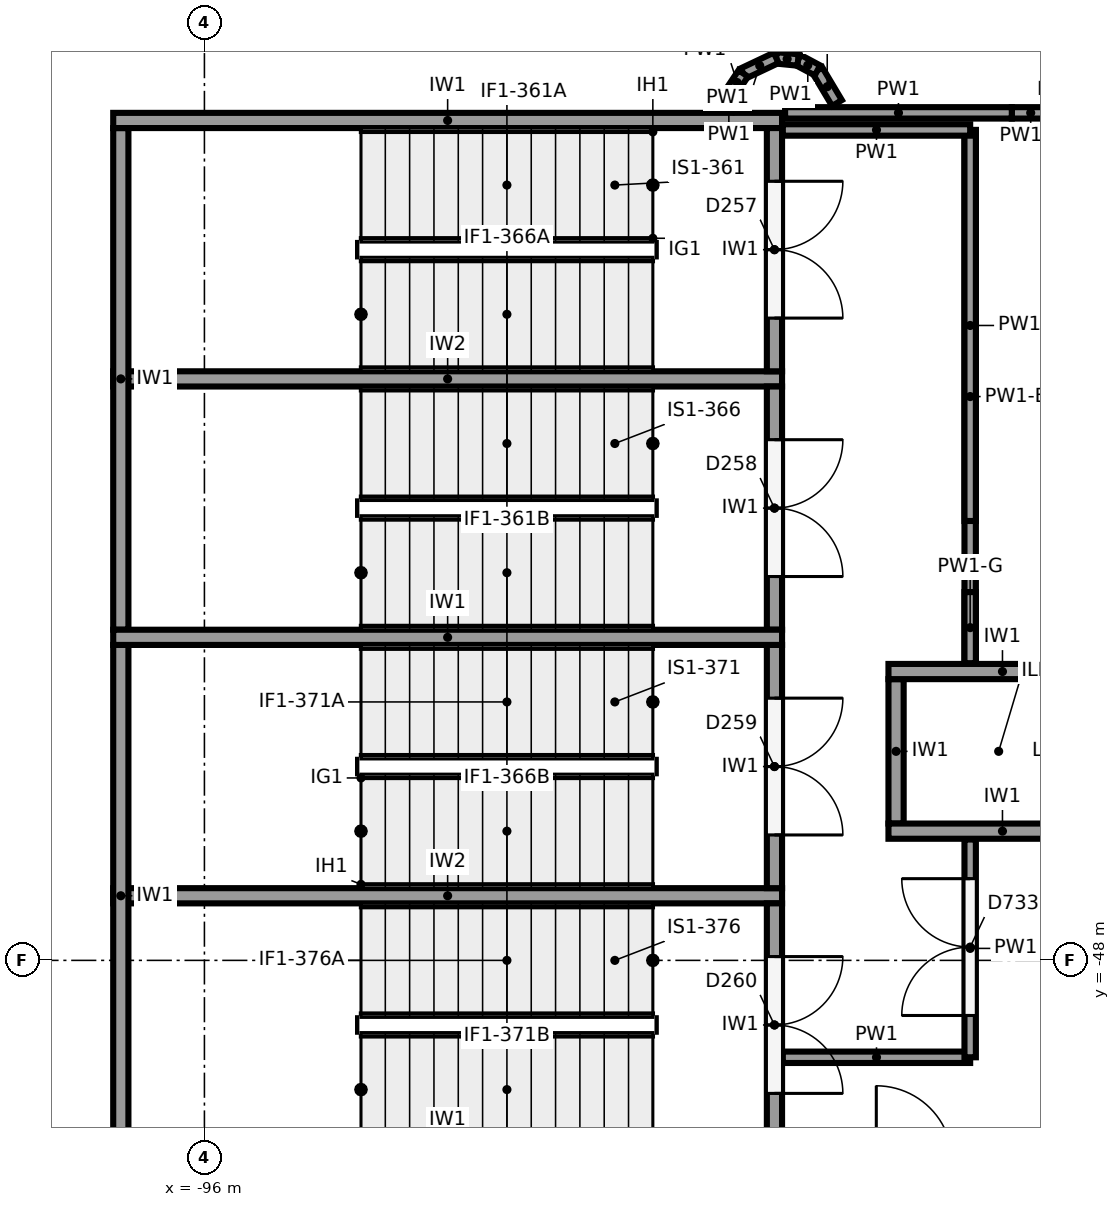
"""IFC4 building model, lengths in metres.
Left out: names, types, materials, properties, quantities, classifications, styles, units other than length and angle.
Written with IfcOpenShell. Run it as: python <this file> out.ifc"""

import sys

from ifc_helpers import new_model, si_unit, direction, frame, frame_2d, origin, origin_2d, place, context, subcontext, project, spatial, rectangle, circle, extrude, element, fill, save


model = new_model("IFC4")
c1 = context("Model", 3, precision=1e-05, world=origin(), true_north=direction((0.0, 1.0)))
c2 = subcontext(c1, "Body", "Model", "MODEL_VIEW")
j1 = project(units=[si_unit("LENGTHUNIT", "METRE"), si_unit("PLANEANGLEUNIT", "RADIAN")], contexts=[c1])
p1 = place(None, origin())
s1 = spatial("IfcSite", under=j1, at=p1, CompositionType="ELEMENT")
p2 = place(p1, origin())
s2 = spatial("IfcBuilding", under=s1, at=p2, CompositionType="ELEMENT")
p3 = place(p2, frame((0.0, 0.0, -4.0)))
s3 = spatial("IfcBuildingStorey", under=s2, at=p3, CompositionType="ELEMENT", Elevation=-4.0)
p4 = place(p3, frame((-84.884, -42.562, -1.2), z_axis=(0.0, 0.0, 1.0), x_axis=(1.0, 0.0, 0.0)))
e1 = element("IfcColumn", 1, at=p4, inside=s3, PredefinedType="COLUMN", context=c2, shape_type="SweptSolid", body=[
    extrude(circle(Radius=0.6, at=origin_2d()), origin(), (0.0, 0.0, 1.0), 5.2),
])
for number, where, z_axis, x_axis in (
    (2, (-97.2, -36.95, -1.2), (0.0, 0.0, 1.0), (1.0, 0.0, 0.0)),
    (3, (-97.2, -43.75, -1.2), (0.0, 0.0, 1.0), (1.0, 0.0, 0.0)),
):
    element("IfcWall", number, at=place(p3, frame(where, z_axis=z_axis, x_axis=x_axis)), inside=s3, PredefinedType="SHEAR", context=c2, shape_type="SweptSolid", body=[
        extrude(rectangle(XDim=8.8, YDim=0.2, at=frame_2d((4.4, 0.0))), origin(), (0.0, 0.0, 1.0), 4.8),
    ])
for number, where, z_axis, x_axis in (
    (4, (-97.1, -37.05, -1.2), (0.0, 0.0, 1.0), (0.0, -1.0, 0.0)),
    (5, (-97.1, -43.85, -1.2), (0.0, 0.0, 1.0), (0.0, -1.0, 0.0)),
):
    element("IfcWall", number, at=place(p3, frame(where, z_axis=z_axis, x_axis=x_axis)), inside=s3, PredefinedType="SHEAR", context=c2, shape_type="SweptSolid", body=[
        extrude(rectangle(XDim=6.6, YDim=0.2, at=frame_2d((3.3, 0.0))), origin(), (0.0, 0.0, 1.0), 4.8),
    ])
for number, where, z_axis, x_axis in (
    (6, (-97.2, -40.35, -1.2), (0.0, 0.0, 1.0), (1.0, 0.0, 0.0)),
    (7, (-97.2, -47.15, -1.2), (0.0, 0.0, 1.0), (1.0, 0.0, 0.0)),
):
    element("IfcWall", number, at=place(p3, frame(where, z_axis=z_axis, x_axis=x_axis)), inside=s3, PredefinedType="SHEAR", context=c2, shape_type="SweptSolid", body=[
        extrude(rectangle(XDim=8.8, YDim=0.2, at=frame_2d((4.4, 0.0))), origin(), (0.0, 0.0, 1.0), 4.8),
    ])
p5 = place(p3, frame((-88.5, -37.05, -1.2), z_axis=(0.0, 0.0, 1.0), x_axis=(0.0, -1.0, 0.0)))
e8 = element("IfcWall", 8, at=p5, inside=s3, PredefinedType="SHEAR", context=c2, shape_type="SweptSolid", body=[
    extrude(rectangle(XDim=3.2, YDim=0.2, at=frame_2d((1.6, 0.0))), origin(), (0.0, 0.0, 1.0), 4.8),
])
p6 = place(p5, frame((0.7, 0.0, 1.2)))
e9 = element("IfcOpeningElement", 9, at=p6, cuts=e8, PredefinedType="OPENING", context=c2, shape_type="SweptSolid", body=[
    extrude(rectangle(XDim=1.8, YDim=2.1, at=frame_2d((0.9, 1.05))), frame((0.0, 0.11, 0.0), z_axis=(0.0, -1.0, 0.0), x_axis=(1.0, 0.0, 0.0)), (0.0, 0.0, 1.0), 0.22),
])
p7 = place(p3, frame((-88.5, -40.45, -1.2), z_axis=(0.0, 0.0, 1.0), x_axis=(0.0, -1.0, 0.0)))
e10 = element("IfcWall", 10, at=p7, inside=s3, PredefinedType="SHEAR", context=c2, shape_type="SweptSolid", body=[
    extrude(rectangle(XDim=3.2, YDim=0.2, at=frame_2d((1.6, 0.0))), origin(), (0.0, 0.0, 1.0), 4.8),
])
p8 = place(p7, frame((0.7, 0.0, 1.2)))
e11 = element("IfcOpeningElement", 11, at=p8, cuts=e10, PredefinedType="OPENING", context=c2, shape_type="SweptSolid", body=[
    extrude(rectangle(XDim=1.8, YDim=2.1, at=frame_2d((0.9, 1.05))), frame((0.0, 0.11, 0.0), z_axis=(0.0, -1.0, 0.0), x_axis=(1.0, 0.0, 0.0)), (0.0, 0.0, 1.0), 0.22),
])
p9 = place(p3, frame((-88.5, -43.85, -1.2), z_axis=(0.0, 0.0, 1.0), x_axis=(0.0, -1.0, 0.0)))
e12 = element("IfcWall", 12, at=p9, inside=s3, PredefinedType="SHEAR", context=c2, shape_type="SweptSolid", body=[
    extrude(rectangle(XDim=3.2, YDim=0.2, at=frame_2d((1.6, 0.0))), origin(), (0.0, 0.0, 1.0), 4.8),
])
p10 = place(p9, frame((0.7, 0.0, 1.2)))
e13 = element("IfcOpeningElement", 13, at=p10, cuts=e12, PredefinedType="OPENING", context=c2, shape_type="SweptSolid", body=[
    extrude(rectangle(XDim=1.8, YDim=2.1, at=frame_2d((0.9, 1.05))), frame((0.0, 0.11, 0.0), z_axis=(0.0, -1.0, 0.0), x_axis=(1.0, 0.0, 0.0)), (0.0, 0.0, 1.0), 0.22),
])
p11 = place(p3, frame((-88.5, -47.25, -1.2), z_axis=(0.0, 0.0, 1.0), x_axis=(0.0, -1.0, 0.0)))
e14 = element("IfcWall", 14, at=p11, inside=s3, PredefinedType="SHEAR", context=c2, shape_type="SweptSolid", body=[
    extrude(rectangle(XDim=3.2, YDim=0.2, at=frame_2d((1.6, 0.0))), origin(), (0.0, 0.0, 1.0), 4.8),
])
p12 = place(p11, frame((0.7, 0.0, 1.2)))
e15 = element("IfcOpeningElement", 15, at=p12, cuts=e14, PredefinedType="OPENING", context=c2, shape_type="SweptSolid", body=[
    extrude(rectangle(XDim=1.8, YDim=2.1, at=frame_2d((0.9, 1.05))), frame((0.0, 0.11, 0.0), z_axis=(0.0, -1.0, 0.0), x_axis=(1.0, 0.0, 0.0)), (0.0, 0.0, 1.0), 0.22),
])
for number, where, z_axis, x_axis in (
    (16, (-87.0, -44.2, -1.2), (0.0, 0.0, 1.0), (1.0, 0.0, 0.0)),
    (17, (-87.0, -46.3, -1.2), (0.0, 0.0, 1.0), (1.0, 0.0, 0.0)),
):
    element("IfcWall", number, at=place(p3, frame(where, z_axis=z_axis, x_axis=x_axis)), inside=s3, PredefinedType="SHEAR", context=c2, shape_type="SweptSolid", body=[
        extrude(rectangle(XDim=3.0, YDim=0.2, at=frame_2d((1.5, 0.0))), origin(), (0.0, 0.0, 1.0), 4.8),
    ])
p13 = place(p3, frame((-86.9, -44.3, -1.2), z_axis=(0.0, 0.0, 1.0), x_axis=(0.0, -1.0, 0.0)))
e18 = element("IfcWall", 18, at=p13, inside=s3, PredefinedType="SHEAR", context=c2, shape_type="SweptSolid", body=[
    extrude(rectangle(XDim=1.9, YDim=0.2, at=frame_2d((0.95, 0.0))), origin(), (0.0, 0.0, 1.0), 4.8),
])
p14 = place(p3, frame((-84.88, -36.85, 0.0), z_axis=(0.0, 0.0, 1.0), x_axis=(-1.0, 0.0, 0.0)))
e19 = element("IfcWall", 19, at=p14, inside=s3, PredefinedType="PARTITIONING", context=c2, shape_type="SweptSolid", body=[
    extrude(rectangle(XDim=0.497, YDim=0.15, at=frame_2d((0.249, 0.0))), origin(), (0.0, 0.0, 1.0), 2.5),
])
p15 = place(p3, frame((-85.377, -36.85, 0.0), z_axis=(0.0, 0.0, 1.0), x_axis=(-1.0, 0.0, 0.0)))
e20 = element("IfcWall", 20, at=p15, inside=s3, PredefinedType="PARTITIONING", context=c2, shape_type="SweptSolid", body=[
    extrude(rectangle(XDim=2.983, YDim=0.15, at=frame_2d((1.491, 0.0))), origin(), (0.0, 0.0, 1.0), 3.6),
])
p16 = place(p3, frame((-88.39, -49.275, 0.0), z_axis=(0.0, 0.0, 1.0), x_axis=(1.0, 0.0, 0.0)))
e21 = element("IfcWall", 21, at=p16, inside=s3, PredefinedType="PARTITIONING", context=c2, shape_type="SweptSolid", body=[
    extrude(rectangle(XDim=2.465, YDim=0.15, at=frame_2d((1.232, 0.0))), origin(), (0.0, 0.0, 1.0), 3.6),
])
p17 = place(p3, frame((-85.925, -49.275, 0.0), z_axis=(0.0, 0.0, 1.0), x_axis=(0.0, 1.0, 0.0)))
e22 = element("IfcWall", 22, at=p17, inside=s3, PredefinedType="PARTITIONING", context=c2, shape_type="SweptSolid", body=[
    extrude(rectangle(XDim=2.865, YDim=0.15, at=frame_2d((1.433, 0.0))), origin(), (0.0, 0.0, 1.0), 3.6),
])
p18 = place(p17, frame((0.55, 0.0, 0.0)))
e23 = element("IfcOpeningElement", 23, at=p18, cuts=e22, PredefinedType="OPENING", context=c2, shape_type="SweptSolid", body=[
    extrude(rectangle(XDim=1.8, YDim=2.1, at=frame_2d((0.9, 1.05))), frame((0.0, 0.085, 0.0), z_axis=(0.0, -1.0, 0.0), x_axis=(1.0, 0.0, 0.0)), (0.0, 0.0, 1.0), 0.17),
])
p19 = place(p3, frame((-85.925, -44.09, 0.0), z_axis=(0.0, 0.0, 1.0), x_axis=(0.0, 1.0, 0.0)))
e24 = element("IfcWall", 24, at=p19, inside=s3, PredefinedType="PARTITIONING", context=c2, shape_type="SweptSolid", body=[
    extrude(rectangle(XDim=7.015, YDim=0.15, at=frame_2d((3.508, 0.0))), origin(), (0.0, 0.0, 1.0), 2.85),
])
p20 = place(p3, frame((-85.925, -44.09, 2.85), z_axis=(0.0, 0.0, 1.0), x_axis=(0.0, 1.0, 0.0)))
e25 = element("IfcWall", 25, at=p20, inside=s3, PredefinedType="PARTITIONING", context=c2, shape_type="SweptSolid", body=[
    extrude(rectangle(XDim=0.935, YDim=0.15, at=frame_2d((0.468, 0.0))), origin(), (0.0, 0.0, 1.0), 0.75),
])
p21 = place(p3, frame((-85.925, -42.219, 2.85), z_axis=(0.0, 0.0, 1.0), x_axis=(0.0, 1.0, 0.0)))
e26 = element("IfcWall", 26, at=p21, inside=s3, PredefinedType="PARTITIONING", context=c2, shape_type="SweptSolid", body=[
    extrude(rectangle(XDim=5.144, YDim=0.15, at=frame_2d((2.572, 0.0))), origin(), (0.0, 0.0, 1.0), 0.75),
])
p22 = place(p3, frame((-85.925, -37.075, 0.0), z_axis=(0.0, 0.0, 1.0), x_axis=(-1.0, 0.0, 0.0)))
e27 = element("IfcWall", 27, at=p22, inside=s3, PredefinedType="PARTITIONING", context=c2, shape_type="SweptSolid", body=[
    extrude(rectangle(XDim=2.465, YDim=0.15, at=frame_2d((1.232, 0.0))), origin(), (0.0, 0.0, 1.0), 3.6),
])
p23 = place(p3, frame((-87.677, -36.721, 0.0), z_axis=(0.0, 0.0, 1.0), x_axis=(-0.513060623194, 0.858352373404, 0.0)))
e28 = element("IfcWall", 28, at=p23, inside=s3, PredefinedType="PARTITIONING", context=c2, shape_type="SweptSolid", body=[
    extrude(rectangle(XDim=0.5, YDim=0.15, at=frame_2d((0.25, 0.0))), origin(), (0.0, 0.0, 1.0), 3.6),
])
for number, where, z_axis, x_axis in (
    (29, (-87.934, -36.291, 0.0), (0.0, 0.0, 1.0), (-0.882, 0.472, 0.0)),
    (30, (-88.189, -36.155, 0.0), (0.0, 0.0, 1.0), (-0.995, 0.098, 0.0)),
):
    element("IfcWall", number, at=place(p3, frame(where, z_axis=z_axis, x_axis=x_axis)), inside=s3, PredefinedType="PARTITIONING", context=c2, shape_type="SweptSolid", body=[
        extrude(rectangle(XDim=0.289, YDim=0.15, at=frame_2d((0.145, 0.0))), origin(), (0.0, 0.0, 1.0), 3.6),
    ])
p24 = place(p3, frame((-88.477, -36.126, 0.0), z_axis=(0.0, 0.0, 1.0), x_axis=(-0.903893315025, -0.427757963167, 0.0)))
e31 = element("IfcWall", 31, at=p24, inside=s3, PredefinedType="PARTITIONING", context=c2, shape_type="SweptSolid", body=[
    extrude(rectangle(XDim=0.479, YDim=0.15, at=frame_2d((0.24, 0.0))), origin(), (0.0, 0.0, 1.0), 3.6),
])
p25 = place(p3, frame((-88.91, -36.332, 0.0), z_axis=(0.0, 0.0, 1.0), x_axis=(-0.555678694372, -0.831397130511, 0.0)))
e32 = element("IfcWall", 32, at=p25, inside=s3, PredefinedType="PARTITIONING", context=c2, shape_type="SweptSolid", body=[
    extrude(rectangle(XDim=0.288, YDim=0.15, at=frame_2d((0.144, 0.0))), origin(), (0.0, 0.0, 1.0), 3.6),
])
p26 = place(p3, frame((-89.07, -36.571, 0.0), z_axis=(0.0, 0.0, 1.0), x_axis=(-0.231150896285, -0.972917911823, 0.0)))
e33 = element("IfcWall", 33, at=p26, inside=s3, PredefinedType="PARTITIONING", context=c2, shape_type="SweptSolid", body=[
    extrude(rectangle(XDim=0.258, YDim=0.15, at=frame_2d((0.129, 0.0))), origin(), (0.0, 0.0, 1.0), 3.6),
])
p27 = place(p6, origin())
e34 = element("IfcDoor", 34, at=p27, inside=s3, OperationType="DOUBLE_DOOR_SINGLE_SWING", PredefinedType="DOOR", context=c2, shape_type="SweptSolid", body=[
    extrude(rectangle(XDim=1.8, YDim=2.1, at=frame_2d((0.9, 1.05))), frame((0.0, 0.025, 0.0), z_axis=(0.0, -1.0, 0.0), x_axis=(1.0, 0.0, 0.0)), (0.0, 0.0, 1.0), 0.05),
])
fill(e9, e34)
p28 = place(p8, origin())
e35 = element("IfcDoor", 35, at=p28, inside=s3, OperationType="DOUBLE_DOOR_SINGLE_SWING", PredefinedType="DOOR", context=c2, shape_type="SweptSolid", body=[
    extrude(rectangle(XDim=1.8, YDim=2.1, at=frame_2d((0.9, 1.05))), frame((0.0, 0.025, 0.0), z_axis=(0.0, -1.0, 0.0), x_axis=(1.0, 0.0, 0.0)), (0.0, 0.0, 1.0), 0.05),
])
fill(e11, e35)
p29 = place(p10, origin())
e36 = element("IfcDoor", 36, at=p29, inside=s3, OperationType="DOUBLE_DOOR_SINGLE_SWING", PredefinedType="DOOR", context=c2, shape_type="SweptSolid", body=[
    extrude(rectangle(XDim=1.8, YDim=2.1, at=frame_2d((0.9, 1.05))), frame((0.0, 0.025, 0.0), z_axis=(0.0, -1.0, 0.0), x_axis=(1.0, 0.0, 0.0)), (0.0, 0.0, 1.0), 0.05),
])
fill(e13, e36)
p30 = place(p12, origin())
e37 = element("IfcDoor", 37, at=p30, inside=s3, OperationType="DOUBLE_DOOR_SINGLE_SWING", PredefinedType="DOOR", context=c2, shape_type="SweptSolid", body=[
    extrude(rectangle(XDim=1.8, YDim=2.1, at=frame_2d((0.9, 1.05))), frame((0.0, 0.025, 0.0), z_axis=(0.0, -1.0, 0.0), x_axis=(1.0, 0.0, 0.0)), (0.0, 0.0, 1.0), 0.05),
])
fill(e15, e37)
p31 = place(p18, origin())
e38 = element("IfcDoor", 38, at=p31, inside=s3, OperationType="DOUBLE_DOOR_SINGLE_SWING", PredefinedType="DOOR", context=c2, shape_type="SweptSolid", body=[
    extrude(rectangle(XDim=1.8, YDim=2.1, at=frame_2d((0.9, 1.05))), frame((0.0, 0.025, 0.0), z_axis=(0.0, -1.0, 0.0), x_axis=(1.0, 0.0, 0.0)), (0.0, 0.0, 1.0), 0.05),
])
fill(e23, e38)
save(model, sys.argv[1])
